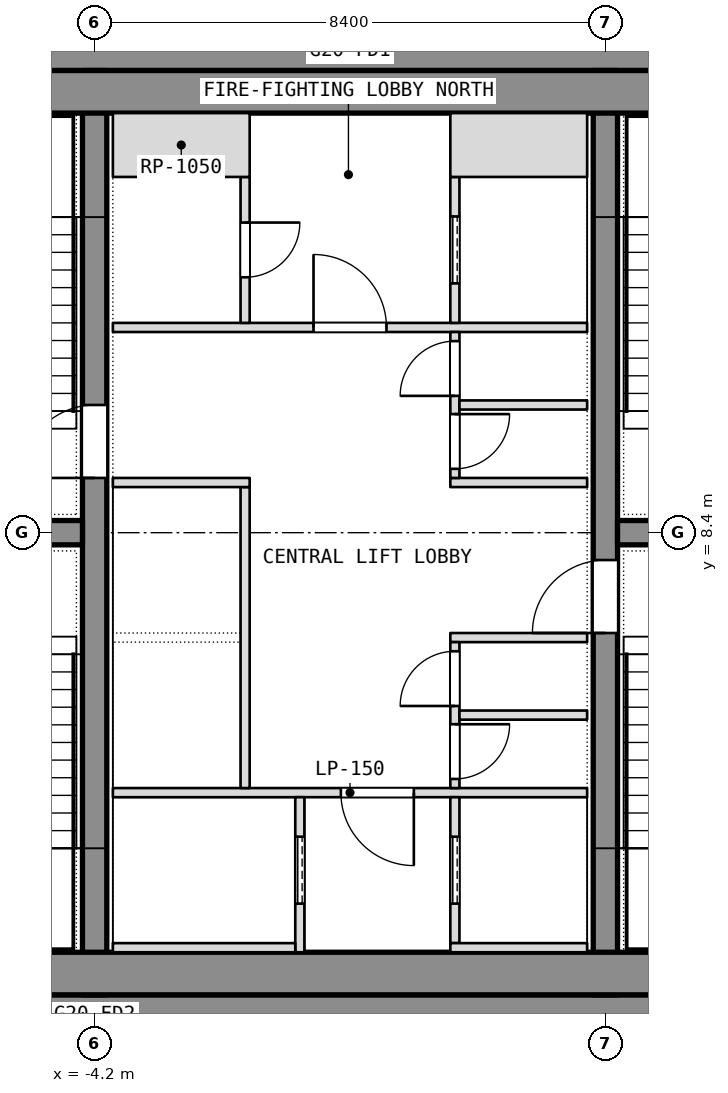
"""IFC4 building model, lengths in metres.
Left out: names, types, materials, properties, quantities, classifications, styles, units other than length and angle.
Written with IfcOpenShell. Run it as: python <this file> out.ifc"""

import sys

from ifc_helpers import new_model, si_unit, direction, frame, frame_2d, origin, place, context, subcontext, project, spatial, rectangle, extrude, element, fill, save


model = new_model("IFC4")
c1 = context("Model", 3, precision=1e-05, world=origin(), true_north=direction((0.0, 1.0)))
c2 = subcontext(c1, "Body", "Model", "MODEL_VIEW")
j1 = project(units=[si_unit("LENGTHUNIT", "METRE"), si_unit("PLANEANGLEUNIT", "RADIAN")], contexts=[c1])
p1 = place(None, origin())
s1 = spatial("IfcSite", under=j1, at=p1, CompositionType="ELEMENT")
p2 = place(p1, origin())
s2 = spatial("IfcBuilding", under=s1, at=p2, CompositionType="ELEMENT")
p3 = place(p2, frame((0.0, 0.0, 238.1)))
s3 = spatial("IfcBuildingStorey", under=s2, at=p3, CompositionType="ELEMENT", Elevation=238.1)
for number, where, z_axis, x_axis in (
    (1, (-11.1, 0.4, 0.0), (0.0, 0.0, 1.0), (1.0, 0.0, 0.0)),
    (2, (-11.1, 16.4, 0.0), (0.0, 0.0, 1.0), (1.0, 0.0, 0.0)),
):
    element("IfcWall", number, at=place(p3, frame(where, z_axis=z_axis, x_axis=x_axis)), inside=s3, PredefinedType="SHEAR", context=c2, shape_type="SweptSolid", body=[
        extrude(rectangle(XDim=22.2, YDim=0.8, at=frame_2d((11.1, 0.0))), origin(), (0.0, 0.0, 1.0), 3.6),
    ])
p4 = place(p3, frame((-4.2, 0.8, 0.0), z_axis=(0.0, 0.0, 1.0), x_axis=(0.0, 1.0, 0.0)))
e3 = element("IfcWall", 3, at=p4, inside=s3, PredefinedType="SHEAR", context=c2, shape_type="SweptSolid", body=[
    extrude(rectangle(XDim=15.2, YDim=0.4, at=frame_2d((7.6, 0.0))), origin(), (0.0, 0.0, 1.0), 3.6),
])
p5 = place(p4, frame((8.5, 0.0, 0.0)))
e4 = element("IfcOpeningElement", 4, at=p5, cuts=e3, PredefinedType="OPENING", context=c2, shape_type="SweptSolid", body=[
    extrude(rectangle(XDim=1.2, YDim=2.1, at=frame_2d((0.6, 1.05))), frame((0.0, 0.2, 0.0), z_axis=(0.0, -1.0, 0.0), x_axis=(1.0, 0.0, 0.0)), (0.0, 0.0, 1.0), 0.4),
])
p6 = place(p3, frame((4.2, 0.8, 0.0), z_axis=(0.0, 0.0, 1.0), x_axis=(0.0, 1.0, 0.0)))
e5 = element("IfcWall", 5, at=p6, inside=s3, PredefinedType="SHEAR", context=c2, shape_type="SweptSolid", body=[
    extrude(rectangle(XDim=15.2, YDim=0.4, at=frame_2d((7.6, 0.0))), origin(), (0.0, 0.0, 1.0), 3.6),
])
p7 = place(p6, frame((5.95, 0.0, 0.0)))
e6 = element("IfcOpeningElement", 6, at=p7, cuts=e5, PredefinedType="OPENING", context=c2, shape_type="SweptSolid", body=[
    extrude(rectangle(XDim=1.2, YDim=2.1, at=frame_2d((0.6, 1.05))), frame((0.0, 0.2, 0.0), z_axis=(0.0, -1.0, 0.0), x_axis=(1.0, 0.0, 0.0)), (0.0, 0.0, 1.0), 0.4),
])
for number, where, z_axis, x_axis in (
    (7, (-11.1, 8.4, 0.0), (0.0, 0.0, 1.0), (1.0, 0.0, 0.0)),
    (8, (4.4, 8.4, 0.0), (0.0, 0.0, 1.0), (1.0, 0.0, 0.0)),
):
    element("IfcWall", number, at=place(p3, frame(where, z_axis=z_axis, x_axis=x_axis)), inside=s3, PredefinedType="SHEAR", context=c2, shape_type="SweptSolid", body=[
        extrude(rectangle(XDim=6.7, YDim=0.4, at=frame_2d((3.35, 0.0))), origin(), (0.0, 0.0, 1.0), 3.6),
    ])
for number, where, z_axis, x_axis in (
    (9, (-11.1, 1.15, 0.0), (0.0, 0.0, 1.0), (1.0, 0.0, 0.0)),
    (10, (-11.1, 15.65, 0.0), (0.0, 0.0, 1.0), (1.0, 0.0, 0.0)),
):
    element("IfcWall", number, at=place(p3, frame(where, z_axis=z_axis, x_axis=x_axis)), inside=s3, PredefinedType="PARTITIONING", context=c2, shape_type="SweptSolid", body=[
        extrude(rectangle(XDim=22.2, YDim=0.7, at=frame_2d((11.1, 0.0))), origin(), (0.0, 0.0, 1.0), 3.34),
    ])
p8 = place(p3, frame((-3.9, 4.125, 0.0), z_axis=(0.0, 0.0, 1.0), x_axis=(1.0, 0.0, 0.0)))
e11 = element("IfcWall", 11, at=p8, inside=s3, PredefinedType="PARTITIONING", context=c2, shape_type="SweptSolid", body=[
    extrude(rectangle(XDim=7.8, YDim=0.15, at=frame_2d((3.9, 0.0))), origin(), (0.0, 0.0, 1.0), 3.34),
])
p9 = place(p8, frame((3.75, 0.0, 0.0)))
e12 = element("IfcOpeningElement", 12, at=p9, cuts=e11, PredefinedType="OPENING", context=c2, shape_type="SweptSolid", body=[
    extrude(rectangle(XDim=1.2, YDim=2.1, at=frame_2d((0.6, 1.05))), frame((0.0, 0.075, 0.0), z_axis=(0.0, -1.0, 0.0), x_axis=(1.0, 0.0, 0.0)), (0.0, 0.0, 1.0), 0.15),
])
p10 = place(p3, frame((-3.9, 11.775, 0.0), z_axis=(0.0, 0.0, 1.0), x_axis=(1.0, 0.0, 0.0)))
e13 = element("IfcWall", 13, at=p10, inside=s3, PredefinedType="PARTITIONING", context=c2, shape_type="SweptSolid", body=[
    extrude(rectangle(XDim=7.8, YDim=0.15, at=frame_2d((3.9, 0.0))), origin(), (0.0, 0.0, 1.0), 3.34),
])
p11 = place(p10, frame((3.3, 0.0, 0.0)))
e14 = element("IfcOpeningElement", 14, at=p11, cuts=e13, PredefinedType="OPENING", context=c2, shape_type="SweptSolid", body=[
    extrude(rectangle(XDim=1.2, YDim=2.1, at=frame_2d((0.6, 1.05))), frame((0.0, 0.075, 0.0), z_axis=(0.0, -1.0, 0.0), x_axis=(1.0, 0.0, 0.0)), (0.0, 0.0, 1.0), 0.15),
])
p12 = place(p3, frame((-0.825, 1.5, 0.0), z_axis=(0.0, 0.0, 1.0), x_axis=(0.0, 1.0, 0.0)))
e15 = element("IfcWall", 15, at=p12, inside=s3, PredefinedType="SHEAR", context=c2, shape_type="SweptSolid", body=[
    extrude(rectangle(XDim=2.55, YDim=0.15, at=frame_2d((1.275, 0.0))), origin(), (0.0, 0.0, 1.0), 3.6),
])
p13 = place(p12, frame((0.8, 0.0, 0.0)))
e16 = element("IfcOpeningElement", 16, at=p13, cuts=e15, PredefinedType="OPENING", context=c2, shape_type="SweptSolid", body=[
    extrude(rectangle(XDim=1.1, YDim=2.1, at=frame_2d((0.55, 1.05))), frame((0.0, 0.075, 0.0), z_axis=(0.0, -1.0, 0.0), x_axis=(1.0, 0.0, 0.0)), (0.0, 0.0, 1.0), 0.15),
])
p14 = place(p3, frame((-3.9, 1.575, 0.0), z_axis=(0.0, 0.0, 1.0), x_axis=(1.0, 0.0, 0.0)))
e17 = element("IfcWall", 17, at=p14, inside=s3, PredefinedType="SHEAR", context=c2, shape_type="SweptSolid", body=[
    extrude(rectangle(XDim=3.0, YDim=0.15, at=frame_2d((1.5, 0.0))), origin(), (0.0, 0.0, 1.0), 3.6),
])
p15 = place(p3, frame((-1.725, 4.2, 0.0), z_axis=(0.0, 0.0, 1.0), x_axis=(0.0, 1.0, 0.0)))
e18 = element("IfcWall", 18, at=p15, inside=s3, PredefinedType="SHEAR", context=c2, shape_type="SweptSolid", body=[
    extrude(rectangle(XDim=4.95, YDim=0.15, at=frame_2d((2.475, 0.0))), origin(), (0.0, 0.0, 1.0), 3.6),
])
p16 = place(p3, frame((-3.9, 9.225, 0.0), z_axis=(0.0, 0.0, 1.0), x_axis=(1.0, 0.0, 0.0)))
e19 = element("IfcWall", 19, at=p16, inside=s3, PredefinedType="SHEAR", context=c2, shape_type="SweptSolid", body=[
    extrude(rectangle(XDim=2.25, YDim=0.15, at=frame_2d((1.125, 0.0))), origin(), (0.0, 0.0, 1.0), 3.6),
])
p17 = place(p3, frame((-1.725, 11.85, 0.0), z_axis=(0.0, 0.0, 1.0), x_axis=(0.0, 1.0, 0.0)))
e20 = element("IfcWall", 20, at=p17, inside=s3, PredefinedType="PARTITIONING", context=c2, shape_type="SweptSolid", body=[
    extrude(rectangle(XDim=2.4, YDim=0.15, at=frame_2d((1.2, 0.0))), origin(), (0.0, 0.0, 1.0), 3.34),
])
p18 = place(p17, frame((0.75, 0.0, 0.0)))
e21 = element("IfcOpeningElement", 21, at=p18, cuts=e20, PredefinedType="OPENING", context=c2, shape_type="SweptSolid", body=[
    extrude(rectangle(XDim=0.9, YDim=2.1, at=frame_2d((0.45, 1.05))), frame((0.0, 0.075, 0.0), z_axis=(0.0, -1.0, 0.0), x_axis=(1.0, 0.0, 0.0)), (0.0, 0.0, 1.0), 0.15),
])
p19 = place(p3, frame((-3.9, 14.775, 0.0), z_axis=(0.0, 0.0, 1.0), x_axis=(1.0, 0.0, 0.0)))
e22 = element("IfcWall", 22, at=p19, inside=s3, PredefinedType="PARTITIONING", context=c2, shape_type="SweptSolid", body=[
    extrude(rectangle(XDim=2.25, YDim=1.05, at=frame_2d((1.125, 0.0))), origin(), (0.0, 0.0, 1.0), 3.34),
])
p20 = place(p3, frame((1.725, 1.65, 0.0), z_axis=(0.0, 0.0, 1.0), x_axis=(0.0, 1.0, 0.0)))
e23 = element("IfcWall", 23, at=p20, inside=s3, PredefinedType="SHEAR", context=c2, shape_type="SweptSolid", body=[
    extrude(rectangle(XDim=2.4, YDim=0.15, at=frame_2d((1.2, 0.0))), origin(), (0.0, 0.0, 1.0), 3.6),
])
p21 = place(p20, frame((0.65, 0.0, 0.0)))
e24 = element("IfcOpeningElement", 24, at=p21, cuts=e23, PredefinedType="OPENING", context=c2, shape_type="SweptSolid", body=[
    extrude(rectangle(XDim=1.1, YDim=2.1, at=frame_2d((0.55, 1.05))), frame((0.0, 0.075, 0.0), z_axis=(0.0, -1.0, 0.0), x_axis=(1.0, 0.0, 0.0)), (0.0, 0.0, 1.0), 0.15),
])
p22 = place(p3, frame((1.65, 1.575, 0.0), z_axis=(0.0, 0.0, 1.0), x_axis=(1.0, 0.0, 0.0)))
e25 = element("IfcWall", 25, at=p22, inside=s3, PredefinedType="SHEAR", context=c2, shape_type="SweptSolid", body=[
    extrude(rectangle(XDim=2.25, YDim=0.15, at=frame_2d((1.125, 0.0))), origin(), (0.0, 0.0, 1.0), 3.6),
])
p23 = place(p3, frame((1.725, 11.85, 0.0), z_axis=(0.0, 0.0, 1.0), x_axis=(0.0, 1.0, 0.0)))
e26 = element("IfcWall", 26, at=p23, inside=s3, PredefinedType="SHEAR", context=c2, shape_type="SweptSolid", body=[
    extrude(rectangle(XDim=2.4, YDim=0.15, at=frame_2d((1.2, 0.0))), origin(), (0.0, 0.0, 1.0), 3.6),
])
p24 = place(p23, frame((0.65, 0.0, 0.0)))
e27 = element("IfcOpeningElement", 27, at=p24, cuts=e26, PredefinedType="OPENING", context=c2, shape_type="SweptSolid", body=[
    extrude(rectangle(XDim=1.1, YDim=2.1, at=frame_2d((0.55, 1.05))), frame((0.0, 0.075, 0.0), z_axis=(0.0, -1.0, 0.0), x_axis=(1.0, 0.0, 0.0)), (0.0, 0.0, 1.0), 0.15),
])
p25 = place(p3, frame((1.65, 14.775, 0.0), z_axis=(0.0, 0.0, 1.0), x_axis=(1.0, 0.0, 0.0)))
e28 = element("IfcWall", 28, at=p25, inside=s3, PredefinedType="SHEAR", context=c2, shape_type="SweptSolid", body=[
    extrude(rectangle(XDim=2.25, YDim=1.05, at=frame_2d((1.125, 0.0))), origin(), (0.0, 0.0, 1.0), 3.6),
])
for number, where, z_axis, x_axis in (
    (29, (1.65, 6.675, 0.0), (0.0, 0.0, 1.0), (1.0, 0.0, 0.0)),
    (30, (1.65, 9.225, 0.0), (0.0, 0.0, 1.0), (1.0, 0.0, 0.0)),
):
    element("IfcWall", number, at=place(p3, frame(where, z_axis=z_axis, x_axis=x_axis)), inside=s3, PredefinedType="PARTITIONING", context=c2, shape_type="SweptSolid", body=[
        extrude(rectangle(XDim=2.25, YDim=0.15, at=frame_2d((1.125, 0.0))), origin(), (0.0, 0.0, 1.0), 3.34),
    ])
p26 = place(p3, frame((1.725, 4.2, 0.0), z_axis=(0.0, 0.0, 1.0), x_axis=(0.0, 1.0, 0.0)))
e31 = element("IfcWall", 31, at=p26, inside=s3, PredefinedType="PARTITIONING", context=c2, shape_type="SweptSolid", body=[
    extrude(rectangle(XDim=2.4, YDim=0.15, at=frame_2d((1.2, 0.0))), origin(), (0.0, 0.0, 1.0), 3.34),
])
p27 = place(p26, frame((0.15, 0.0, 0.0)))
e32 = element("IfcOpeningElement", 32, at=p27, cuts=e31, PredefinedType="OPENING", context=c2, shape_type="SweptSolid", body=[
    extrude(rectangle(XDim=0.9, YDim=2.1, at=frame_2d((0.45, 1.05))), frame((0.0, 0.075, 0.0), z_axis=(0.0, -1.0, 0.0), x_axis=(1.0, 0.0, 0.0)), (0.0, 0.0, 1.0), 0.15),
])
p28 = place(p26, frame((1.35, 0.0, 0.0)))
e33 = element("IfcOpeningElement", 33, at=p28, cuts=e31, PredefinedType="OPENING", context=c2, shape_type="SweptSolid", body=[
    extrude(rectangle(XDim=0.9, YDim=2.1, at=frame_2d((0.45, 1.05))), frame((0.0, 0.075, 0.0), z_axis=(0.0, -1.0, 0.0), x_axis=(1.0, 0.0, 0.0)), (0.0, 0.0, 1.0), 0.15),
])
p29 = place(p3, frame((1.725, 9.3, 0.0), z_axis=(0.0, 0.0, 1.0), x_axis=(0.0, 1.0, 0.0)))
e34 = element("IfcWall", 34, at=p29, inside=s3, PredefinedType="PARTITIONING", context=c2, shape_type="SweptSolid", body=[
    extrude(rectangle(XDim=2.4, YDim=0.15, at=frame_2d((1.2, 0.0))), origin(), (0.0, 0.0, 1.0), 3.34),
])
p30 = place(p29, frame((0.15, 0.0, 0.0)))
e35 = element("IfcOpeningElement", 35, at=p30, cuts=e34, PredefinedType="OPENING", context=c2, shape_type="SweptSolid", body=[
    extrude(rectangle(XDim=0.9, YDim=2.1, at=frame_2d((0.45, 1.05))), frame((0.0, 0.075, 0.0), z_axis=(0.0, -1.0, 0.0), x_axis=(1.0, 0.0, 0.0)), (0.0, 0.0, 1.0), 0.15),
])
p31 = place(p29, frame((1.35, 0.0, 0.0)))
e36 = element("IfcOpeningElement", 36, at=p31, cuts=e34, PredefinedType="OPENING", context=c2, shape_type="SweptSolid", body=[
    extrude(rectangle(XDim=0.9, YDim=2.1, at=frame_2d((0.45, 1.05))), frame((0.0, 0.075, 0.0), z_axis=(0.0, -1.0, 0.0), x_axis=(1.0, 0.0, 0.0)), (0.0, 0.0, 1.0), 0.15),
])
for number, where, z_axis, x_axis in (
    (37, (1.8, 5.4, 0.0), (0.0, 0.0, 1.0), (1.0, 0.0, 0.0)),
    (38, (1.8, 10.5, 0.0), (0.0, 0.0, 1.0), (1.0, 0.0, 0.0)),
):
    element("IfcWall", number, at=place(p3, frame(where, z_axis=z_axis, x_axis=x_axis)), inside=s3, PredefinedType="PARTITIONING", context=c2, shape_type="SweptSolid", body=[
        extrude(rectangle(XDim=2.1, YDim=0.15, at=frame_2d((1.05, 0.0))), origin(), (0.0, 0.0, 1.0), 3.34),
    ])
p32 = place(p27, origin())
e39 = element("IfcDoor", 39, at=p32, inside=s3, OperationType="SINGLE_SWING_LEFT", PredefinedType="DOOR", context=c2, shape_type="SweptSolid", body=[
    extrude(rectangle(XDim=0.9, YDim=2.1, at=frame_2d((0.45, 1.05))), frame((0.0, 0.025, 0.0), z_axis=(0.0, -1.0, 0.0), x_axis=(1.0, 0.0, 0.0)), (0.0, 0.0, 1.0), 0.05),
])
fill(e32, e39)
p33 = place(p28, origin())
e40 = element("IfcDoor", 40, at=p33, inside=s3, OperationType="SINGLE_SWING_LEFT", PredefinedType="DOOR", context=c2, shape_type="SweptSolid", body=[
    extrude(rectangle(XDim=0.9, YDim=2.1, at=frame_2d((0.45, 1.05))), frame((0.0, 0.025, 0.0), z_axis=(0.0, -1.0, 0.0), x_axis=(1.0, 0.0, 0.0)), (0.0, 0.0, 1.0), 0.05),
])
fill(e33, e40)
p34 = place(p30, origin())
e41 = element("IfcDoor", 41, at=p34, inside=s3, OperationType="SINGLE_SWING_LEFT", PredefinedType="DOOR", context=c2, shape_type="SweptSolid", body=[
    extrude(rectangle(XDim=0.9, YDim=2.1, at=frame_2d((0.45, 1.05))), frame((0.0, 0.025, 0.0), z_axis=(0.0, -1.0, 0.0), x_axis=(1.0, 0.0, 0.0)), (0.0, 0.0, 1.0), 0.05),
])
fill(e35, e41)
p35 = place(p31, origin())
e42 = element("IfcDoor", 42, at=p35, inside=s3, OperationType="SINGLE_SWING_LEFT", PredefinedType="DOOR", context=c2, shape_type="SweptSolid", body=[
    extrude(rectangle(XDim=0.9, YDim=2.1, at=frame_2d((0.45, 1.05))), frame((0.0, 0.025, 0.0), z_axis=(0.0, -1.0, 0.0), x_axis=(1.0, 0.0, 0.0)), (0.0, 0.0, 1.0), 0.05),
])
fill(e36, e42)
p36 = place(p13, origin())
e43 = element("IfcDoor", 43, at=p36, inside=s3, OperationType="SLIDING_TO_LEFT", PredefinedType="DOOR", context=c2, shape_type="SweptSolid", body=[
    extrude(rectangle(XDim=1.1, YDim=2.1, at=frame_2d((0.55, 1.05))), frame((0.0, 0.025, 0.0), z_axis=(0.0, -1.0, 0.0), x_axis=(1.0, 0.0, 0.0)), (0.0, 0.0, 1.0), 0.05),
])
fill(e16, e43)
p37 = place(p21, origin())
e44 = element("IfcDoor", 44, at=p37, inside=s3, OperationType="SLIDING_TO_LEFT", PredefinedType="DOOR", context=c2, shape_type="SweptSolid", body=[
    extrude(rectangle(XDim=1.1, YDim=2.1, at=frame_2d((0.55, 1.05))), frame((0.0, 0.025, 0.0), z_axis=(0.0, -1.0, 0.0), x_axis=(1.0, 0.0, 0.0)), (0.0, 0.0, 1.0), 0.05),
])
fill(e24, e44)
p38 = place(p24, origin())
e45 = element("IfcDoor", 45, at=p38, inside=s3, OperationType="SLIDING_TO_LEFT", PredefinedType="DOOR", context=c2, shape_type="SweptSolid", body=[
    extrude(rectangle(XDim=1.1, YDim=2.1, at=frame_2d((0.55, 1.05))), frame((0.0, 0.025, 0.0), z_axis=(0.0, -1.0, 0.0), x_axis=(1.0, 0.0, 0.0)), (0.0, 0.0, 1.0), 0.05),
])
fill(e27, e45)
p39 = place(p9, origin())
e46 = element("IfcDoor", 46, at=p39, inside=s3, OperationType="SINGLE_SWING_LEFT", PredefinedType="DOOR", context=c2, shape_type="SweptSolid", body=[
    extrude(rectangle(XDim=1.2, YDim=2.1, at=frame_2d((0.6, 1.05))), frame((0.0, 0.025, 0.0), z_axis=(0.0, -1.0, 0.0), x_axis=(1.0, 0.0, 0.0)), (0.0, 0.0, 1.0), 0.05),
])
fill(e12, e46)
p40 = place(p11, origin())
e47 = element("IfcDoor", 47, at=p40, inside=s3, OperationType="SINGLE_SWING_LEFT", PredefinedType="DOOR", context=c2, shape_type="SweptSolid", body=[
    extrude(rectangle(XDim=1.2, YDim=2.1, at=frame_2d((0.6, 1.05))), frame((0.0, 0.025, 0.0), z_axis=(0.0, -1.0, 0.0), x_axis=(1.0, 0.0, 0.0)), (0.0, 0.0, 1.0), 0.05),
])
fill(e14, e47)
p41 = place(p18, origin())
e48 = element("IfcDoor", 48, at=p41, inside=s3, OperationType="SINGLE_SWING_LEFT", PredefinedType="DOOR", context=c2, shape_type="SweptSolid", body=[
    extrude(rectangle(XDim=0.9, YDim=2.1, at=frame_2d((0.45, 1.05))), frame((0.0, 0.025, 0.0), z_axis=(0.0, -1.0, 0.0), x_axis=(1.0, 0.0, 0.0)), (0.0, 0.0, 1.0), 0.05),
])
fill(e21, e48)
p42 = place(p5, origin())
e49 = element("IfcDoor", 49, at=p42, inside=s3, OperationType="SINGLE_SWING_LEFT", PredefinedType="DOOR", context=c2, shape_type="SweptSolid", body=[
    extrude(rectangle(XDim=1.2, YDim=2.1, at=frame_2d((0.6, 1.05))), frame((0.0, 0.025, 0.0), z_axis=(0.0, -1.0, 0.0), x_axis=(1.0, 0.0, 0.0)), (0.0, 0.0, 1.0), 0.05),
])
fill(e4, e49)
p43 = place(p7, origin())
e50 = element("IfcDoor", 50, at=p43, inside=s3, OperationType="SINGLE_SWING_LEFT", PredefinedType="DOOR", context=c2, shape_type="SweptSolid", body=[
    extrude(rectangle(XDim=1.2, YDim=2.1, at=frame_2d((0.6, 1.05))), frame((0.0, 0.025, 0.0), z_axis=(0.0, -1.0, 0.0), x_axis=(1.0, 0.0, 0.0)), (0.0, 0.0, 1.0), 0.05),
])
fill(e6, e50)
save(model, sys.argv[1])
